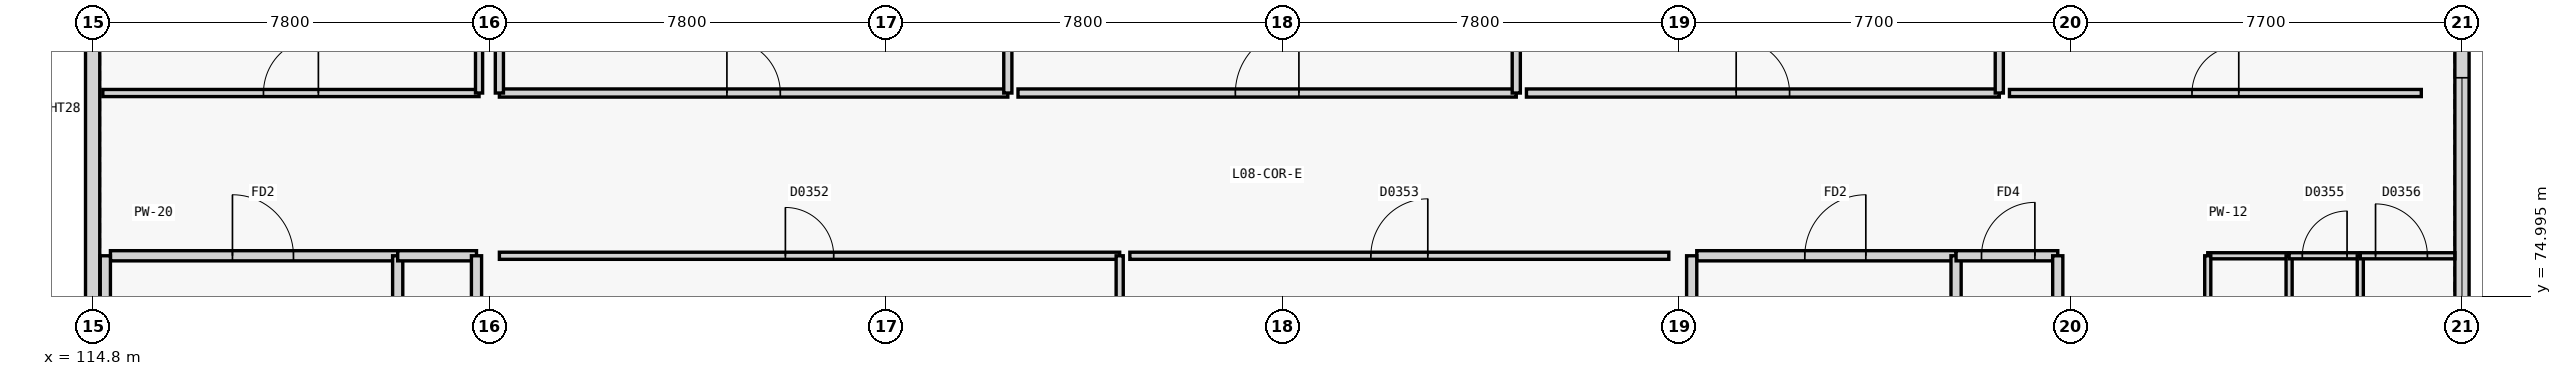
"""IFC4 building model, lengths in metres.
Left out: names, types, materials, properties, quantities, classifications, styles, units other than length and angle.
Written with IfcOpenShell. Run it as: python <this file> out.ifc"""

import sys

from ifc_helpers import new_model, si_unit, direction, frame, frame_2d, origin, place, context, subcontext, project, spatial, rectangle, extrude, element, fill, save


model = new_model("IFC4")
c1 = context("Model", 3, precision=1e-05, world=origin(), true_north=direction((0.0, 1.0)))
c2 = subcontext(c1, "Body", "Model", "MODEL_VIEW")
j1 = project(units=[si_unit("LENGTHUNIT", "METRE"), si_unit("PLANEANGLEUNIT", "RADIAN")], contexts=[c1])
p1 = place(None, origin())
s1 = spatial("IfcSite", under=j1, at=p1, CompositionType="ELEMENT")
p2 = place(p1, origin())
s2 = spatial("IfcBuilding", under=s1, at=p2, CompositionType="ELEMENT")
p3 = place(p2, frame((0.0, 0.0, 32.4)))
s3 = spatial("IfcBuildingStorey", under=s2, at=p3, CompositionType="ELEMENT", Elevation=32.4)
p4 = place(p3, frame((161.4, 96.802, 0.0), z_axis=(0.0, 0.0, 1.0), x_axis=(0.0, -1.0, 0.0)))
e1 = element("IfcWall", 1, at=p4, inside=s3, PredefinedType="SOLIDWALL", context=c2, shape_type="SweptSolid", body=[
    extrude(rectangle(XDim=32.604, YDim=0.28, at=frame_2d((16.302, 0.0))), origin(), (0.0, 0.0, 1.0), 2.8),
])
p5 = place(p4, frame((17.502, 0.0, 0.82)))
e2 = element("IfcOpeningElement", 2, at=p5, cuts=e1, PredefinedType="OPENING", context=c2, shape_type="SweptSolid", body=[
    extrude(rectangle(XDim=4.6, YDim=1.6, at=frame_2d((2.3, 0.8))), frame((0.0, 0.15, 0.0), z_axis=(0.0, -1.0, 0.0), x_axis=(1.0, 0.0, 0.0)), (0.0, 0.0, 1.0), 0.3),
])
p6 = place(p3, frame((114.8, 72.598, 0.0), z_axis=(0.0, 0.0, 1.0), x_axis=(0.0, 1.0, 0.0)))
e3 = element("IfcWall", 3, at=p6, inside=s3, PredefinedType="SOLIDWALL", context=c2, shape_type="SweptSolid", body=[
    extrude(rectangle(XDim=12.204, YDim=0.28, at=frame_2d((6.102, 0.0))), origin(), (0.0, 0.0, 1.0), 2.8),
])
p7 = place(p3, frame((115.15, 75.8, 0.0), z_axis=(0.0, 0.0, 1.0), x_axis=(1.0, 0.0, 0.0)))
e4 = element("IfcWall", 4, at=p7, inside=s3, PredefinedType="PARTITIONING", context=c2, shape_type="SweptSolid", body=[
    extrude(rectangle(XDim=5.65, YDim=0.2, at=frame_2d((2.825, 0.0))), origin(), (0.0, 0.0, 1.0), 3.32),
])
p8 = place(p7, frame((2.4, 0.0, 0.0)))
e5 = element("IfcOpeningElement", 5, at=p8, cuts=e4, PredefinedType="OPENING", context=c2, shape_type="SweptSolid", body=[
    extrude(rectangle(XDim=1.2, YDim=2.2, at=frame_2d((0.6, 1.1))), frame((0.0, 0.11, 0.0), z_axis=(0.0, -1.0, 0.0), x_axis=(1.0, 0.0, 0.0)), (0.0, 0.0, 1.0), 0.22),
])
p9 = place(p3, frame((115.05, 72.4, 0.0), z_axis=(0.0, 0.0, 1.0), x_axis=(0.0, 1.0, 0.0)))
e6 = element("IfcWall", 6, at=p9, inside=s3, PredefinedType="PARTITIONING", context=c2, shape_type="SweptSolid", body=[
    extrude(rectangle(XDim=3.4, YDim=0.2, at=frame_2d((1.7, 0.0))), origin(), (0.0, 0.0, 1.0), 2.8),
])
p10 = place(p3, frame((120.8, 72.4, 0.0), z_axis=(0.0, 0.0, 1.0), x_axis=(0.0, 1.0, 0.0)))
e7 = element("IfcWall", 7, at=p10, inside=s3, PredefinedType="PARTITIONING", context=c2, shape_type="SweptSolid", body=[
    extrude(rectangle(XDim=3.4, YDim=0.2, at=frame_2d((1.7, 0.0))), origin(), (0.0, 0.0, 1.0), 3.32),
])
p11 = place(p10, frame((1.1, 0.0, 0.0)))
e8 = element("IfcOpeningElement", 8, at=p11, cuts=e7, PredefinedType="OPENING", context=c2, shape_type="SweptSolid", body=[
    extrude(rectangle(XDim=1.2, YDim=2.2, at=frame_2d((0.6, 1.1))), frame((0.0, 0.11, 0.0), z_axis=(0.0, -1.0, 0.0), x_axis=(1.0, 0.0, 0.0)), (0.0, 0.0, 1.0), 0.22),
])
p12 = place(p3, frame((120.8, 75.8, 0.0), z_axis=(0.0, 0.0, 1.0), x_axis=(1.0, 0.0, 0.0)))
e9 = element("IfcWall", 9, at=p12, inside=s3, PredefinedType="PARTITIONING", context=c2, shape_type="SweptSolid", body=[
    extrude(rectangle(XDim=1.55, YDim=0.2, at=frame_2d((0.775, 0.0))), origin(), (0.0, 0.0, 1.0), 3.32),
])
p13 = place(p3, frame((122.35, 72.4, 0.0), z_axis=(0.0, 0.0, 1.0), x_axis=(0.0, 1.0, 0.0)))
e10 = element("IfcWall", 10, at=p13, inside=s3, PredefinedType="PARTITIONING", context=c2, shape_type="SweptSolid", body=[
    extrude(rectangle(XDim=3.4, YDim=0.2, at=frame_2d((1.7, 0.0))), origin(), (0.0, 0.0, 1.0), 2.88),
])
p14 = place(p3, frame((146.35, 75.8, 0.0), z_axis=(0.0, 0.0, 1.0), x_axis=(1.0, 0.0, 0.0)))
e11 = element("IfcWall", 11, at=p14, inside=s3, PredefinedType="PARTITIONING", context=c2, shape_type="SweptSolid", body=[
    extrude(rectangle(XDim=5.1, YDim=0.2, at=frame_2d((2.55, 0.0))), origin(), (0.0, 0.0, 1.0), 3.32),
])
p15 = place(p14, frame((2.125, 0.0, 0.0)))
e12 = element("IfcOpeningElement", 12, at=p15, cuts=e11, PredefinedType="OPENING", context=c2, shape_type="SweptSolid", body=[
    extrude(rectangle(XDim=1.2, YDim=2.2, at=frame_2d((0.6, 1.1))), frame((0.0, 0.11, 0.0), z_axis=(0.0, -1.0, 0.0), x_axis=(1.0, 0.0, 0.0)), (0.0, 0.0, 1.0), 0.22),
])
p16 = place(p3, frame((146.25, 72.4, 0.0), z_axis=(0.0, 0.0, 1.0), x_axis=(0.0, 1.0, 0.0)))
e13 = element("IfcWall", 13, at=p16, inside=s3, PredefinedType="PARTITIONING", context=c2, shape_type="SweptSolid", body=[
    extrude(rectangle(XDim=3.4, YDim=0.2, at=frame_2d((1.7, 0.0))), origin(), (0.0, 0.0, 1.0), 2.88),
])
p17 = place(p3, frame((151.45, 72.4, 0.0), z_axis=(0.0, 0.0, 1.0), x_axis=(0.0, 1.0, 0.0)))
e14 = element("IfcWall", 14, at=p17, inside=s3, PredefinedType="PARTITIONING", context=c2, shape_type="SweptSolid", body=[
    extrude(rectangle(XDim=3.4, YDim=0.2, at=frame_2d((1.7, 0.0))), origin(), (0.0, 0.0, 1.0), 3.32),
])
p18 = place(p17, frame((1.1, 0.0, 0.0)))
e15 = element("IfcOpeningElement", 15, at=p18, cuts=e14, PredefinedType="OPENING", context=c2, shape_type="SweptSolid", body=[
    extrude(rectangle(XDim=1.2, YDim=2.2, at=frame_2d((0.6, 1.1))), frame((0.0, 0.11, 0.0), z_axis=(0.0, -1.0, 0.0), x_axis=(1.0, 0.0, 0.0)), (0.0, 0.0, 1.0), 0.22),
])
p19 = place(p3, frame((151.45, 75.8, 0.0), z_axis=(0.0, 0.0, 1.0), x_axis=(1.0, 0.0, 0.0)))
e16 = element("IfcWall", 16, at=p19, inside=s3, PredefinedType="PARTITIONING", context=c2, shape_type="SweptSolid", body=[
    extrude(rectangle(XDim=2.0, YDim=0.2, at=frame_2d((1.0, 0.0))), origin(), (0.0, 0.0, 1.0), 3.32),
])
p20 = place(p19, frame((0.5, 0.0, 0.0)))
e17 = element("IfcOpeningElement", 17, at=p20, cuts=e16, PredefinedType="OPENING", context=c2, shape_type="SweptSolid", body=[
    extrude(rectangle(XDim=1.05, YDim=2.15, at=frame_2d((0.525, 1.075))), frame((0.0, 0.11, 0.0), z_axis=(0.0, -1.0, 0.0), x_axis=(1.0, 0.0, 0.0)), (0.0, 0.0, 1.0), 0.22),
])
p21 = place(p3, frame((153.45, 72.4, 0.0), z_axis=(0.0, 0.0, 1.0), x_axis=(0.0, 1.0, 0.0)))
e18 = element("IfcWall", 18, at=p21, inside=s3, PredefinedType="PARTITIONING", context=c2, shape_type="SweptSolid", body=[
    extrude(rectangle(XDim=3.4, YDim=0.2, at=frame_2d((1.7, 0.0))), origin(), (0.0, 0.0, 1.0), 2.88),
])
p22 = place(p3, frame((115.0, 79.0, 0.0), z_axis=(0.0, 0.0, 1.0), x_axis=(1.0, 0.0, 0.0)))
e19 = element("IfcWall", 19, at=p22, inside=s3, PredefinedType="PARTITIONING", context=c2, shape_type="SweptSolid", body=[
    extrude(rectangle(XDim=7.4, YDim=0.14, at=frame_2d((3.7, 0.0))), origin(), (0.0, 0.0, 1.0), 3.34),
])
p23 = place(p22, frame((3.16, 0.0, 0.0)))
e20 = element("IfcOpeningElement", 20, at=p23, cuts=e19, PredefinedType="OPENING", context=c2, shape_type="SweptSolid", body=[
    extrude(rectangle(XDim=1.08, YDim=2.2, at=frame_2d((0.54, 1.1))), frame((0.0, 0.08, 0.0), z_axis=(0.0, -1.0, 0.0), x_axis=(1.0, 0.0, 0.0)), (0.0, 0.0, 1.0), 0.16),
])
p24 = place(p3, frame((122.4, 79.0, 0.0), z_axis=(0.0, 0.0, 1.0), x_axis=(0.0, 1.0, 0.0)))
e21 = element("IfcWall", 21, at=p24, inside=s3, PredefinedType="PARTITIONING", context=c2, shape_type="SweptSolid", body=[
    extrude(rectangle(XDim=5.4, YDim=0.14, at=frame_2d((2.7, 0.0))), origin(), (0.0, 0.0, 1.0), 2.88),
])
p25 = place(p3, frame((122.8, 75.8, 0.0), z_axis=(0.0, 0.0, 1.0), x_axis=(1.0, 0.0, 0.0)))
e22 = element("IfcWall", 22, at=p25, inside=s3, PredefinedType="PARTITIONING", context=c2, shape_type="SweptSolid", body=[
    extrude(rectangle(XDim=12.2, YDim=0.14, at=frame_2d((6.1, 0.0))), origin(), (0.0, 0.0, 1.0), 3.34),
])
p26 = place(p25, frame((5.625, 0.0, 0.0)))
e23 = element("IfcOpeningElement", 23, at=p26, cuts=e22, PredefinedType="OPENING", context=c2, shape_type="SweptSolid", body=[
    extrude(rectangle(XDim=0.95, YDim=2.1, at=frame_2d((0.475, 1.05))), frame((0.0, 0.08, 0.0), z_axis=(0.0, -1.0, 0.0), x_axis=(1.0, 0.0, 0.0)), (0.0, 0.0, 1.0), 0.16),
])
p27 = place(p3, frame((135.0, 65.2, 0.0), z_axis=(0.0, 0.0, 1.0), x_axis=(0.0, 1.0, 0.0)))
e24 = element("IfcWall", 24, at=p27, inside=s3, PredefinedType="PARTITIONING", context=c2, shape_type="SweptSolid", body=[
    extrude(rectangle(XDim=10.6, YDim=0.14, at=frame_2d((5.3, 0.0))), origin(), (0.0, 0.0, 1.0), 3.34),
])
p28 = place(p3, frame((135.2, 75.8, 0.0), z_axis=(0.0, 0.0, 1.0), x_axis=(1.0, 0.0, 0.0)))
e25 = element("IfcWall", 25, at=p28, inside=s3, PredefinedType="PARTITIONING", context=c2, shape_type="SweptSolid", body=[
    extrude(rectangle(XDim=10.6, YDim=0.14, at=frame_2d((5.3, 0.0))), origin(), (0.0, 0.0, 1.0), 3.34),
])
p29 = place(p28, frame((4.74, 0.0, 0.0)))
e26 = element("IfcOpeningElement", 26, at=p29, cuts=e25, PredefinedType="OPENING", context=c2, shape_type="SweptSolid", body=[
    extrude(rectangle(XDim=1.12, YDim=2.15, at=frame_2d((0.56, 1.075))), frame((0.0, 0.08, 0.0), z_axis=(0.0, -1.0, 0.0), x_axis=(1.0, 0.0, 0.0)), (0.0, 0.0, 1.0), 0.16),
])
p30 = place(p3, frame((156.4, 75.8, 0.0), z_axis=(0.0, 0.0, 1.0), x_axis=(1.0, 0.0, 0.0)))
e27 = element("IfcWall", 27, at=p30, inside=s3, PredefinedType="PARTITIONING", context=c2, shape_type="SweptSolid", body=[
    extrude(rectangle(XDim=1.6, YDim=0.12, at=frame_2d((0.8, 0.0))), origin(), (0.0, 0.0, 1.0), 3.34),
])
p31 = place(p3, frame((156.4, 70.6, 0.0), z_axis=(0.0, 0.0, 1.0), x_axis=(0.0, 1.0, 0.0)))
e28 = element("IfcWall", 28, at=p31, inside=s3, PredefinedType="PARTITIONING", context=c2, shape_type="SweptSolid", body=[
    extrude(rectangle(XDim=5.2, YDim=0.12, at=frame_2d((2.6, 0.0))), origin(), (0.0, 0.0, 1.0), 3.34),
])
p32 = place(p31, frame((2.16, 0.0, 0.0)))
e29 = element("IfcOpeningElement", 29, at=p32, cuts=e28, PredefinedType="OPENING", context=c2, shape_type="SweptSolid", body=[
    extrude(rectangle(XDim=0.88, YDim=2.1, at=frame_2d((0.44, 1.05))), frame((0.0, 0.07, 0.0), z_axis=(0.0, -1.0, 0.0), x_axis=(1.0, 0.0, 0.0)), (0.0, 0.0, 1.0), 0.14),
])
p33 = place(p3, frame((158.0, 70.6, 0.0), z_axis=(0.0, 0.0, 1.0), x_axis=(0.0, 1.0, 0.0)))
e30 = element("IfcWall", 30, at=p33, inside=s3, PredefinedType="PARTITIONING", context=c2, shape_type="SweptSolid", body=[
    extrude(rectangle(XDim=5.2, YDim=0.12, at=frame_2d((2.6, 0.0))), origin(), (0.0, 0.0, 1.0), 3.34),
])
p34 = place(p3, frame((158.0, 75.8, 0.0), z_axis=(0.0, 0.0, 1.0), x_axis=(1.0, 0.0, 0.0)))
e31 = element("IfcWall", 31, at=p34, inside=s3, PredefinedType="PARTITIONING", context=c2, shape_type="SweptSolid", body=[
    extrude(rectangle(XDim=1.4, YDim=0.12, at=frame_2d((0.7, 0.0))), origin(), (0.0, 0.0, 1.0), 3.34),
])
p35 = place(p34, frame((0.26, 0.0, 0.0)))
e32 = element("IfcOpeningElement", 32, at=p35, cuts=e31, PredefinedType="OPENING", context=c2, shape_type="SweptSolid", body=[
    extrude(rectangle(XDim=0.88, YDim=2.1, at=frame_2d((0.44, 1.05))), frame((0.0, 0.07, 0.0), z_axis=(0.0, -1.0, 0.0), x_axis=(1.0, 0.0, 0.0)), (0.0, 0.0, 1.0), 0.14),
])
p36 = place(p3, frame((159.4, 70.6, 0.0), z_axis=(0.0, 0.0, 1.0), x_axis=(0.0, 1.0, 0.0)))
e33 = element("IfcWall", 33, at=p36, inside=s3, PredefinedType="PARTITIONING", context=c2, shape_type="SweptSolid", body=[
    extrude(rectangle(XDim=5.2, YDim=0.12, at=frame_2d((2.6, 0.0))), origin(), (0.0, 0.0, 1.0), 3.34),
])
p37 = place(p3, frame((159.4, 75.8, 0.0), z_axis=(0.0, 0.0, 1.0), x_axis=(1.0, 0.0, 0.0)))
e34 = element("IfcWall", 34, at=p37, inside=s3, PredefinedType="PARTITIONING", context=c2, shape_type="SweptSolid", body=[
    extrude(rectangle(XDim=1.86, YDim=0.12, at=frame_2d((0.93, 0.0))), origin(), (0.0, 0.0, 1.0), 3.34),
])
p38 = place(p37, frame((0.3, 0.0, 0.0)))
e35 = element("IfcOpeningElement", 35, at=p38, cuts=e34, PredefinedType="OPENING", context=c2, shape_type="SweptSolid", body=[
    extrude(rectangle(XDim=1.02, YDim=2.1, at=frame_2d((0.51, 1.05))), frame((0.0, 0.07, 0.0), z_axis=(0.0, -1.0, 0.0), x_axis=(1.0, 0.0, 0.0)), (0.0, 0.0, 1.0), 0.14),
])
p39 = place(p3, frame((122.8, 79.0, 0.0), z_axis=(0.0, 0.0, 1.0), x_axis=(1.0, 0.0, 0.0)))
e36 = element("IfcWall", 36, at=p39, inside=s3, PredefinedType="PARTITIONING", context=c2, shape_type="SweptSolid", body=[
    extrude(rectangle(XDim=10.0, YDim=0.16, at=frame_2d((5.0, 0.0))), origin(), (0.0, 0.0, 1.0), 3.34),
])
p40 = place(p39, frame((4.475, 0.0, 0.0)))
e37 = element("IfcOpeningElement", 37, at=p40, cuts=e36, PredefinedType="OPENING", context=c2, shape_type="SweptSolid", body=[
    extrude(rectangle(XDim=1.05, YDim=2.15, at=frame_2d((0.525, 1.075))), frame((0.0, 0.09, 0.0), z_axis=(0.0, -1.0, 0.0), x_axis=(1.0, 0.0, 0.0)), (0.0, 0.0, 1.0), 0.18),
])
p41 = place(p3, frame((122.8, 79.0, 0.0), z_axis=(0.0, 0.0, 1.0), x_axis=(0.0, 1.0, 0.0)))
e38 = element("IfcWall", 38, at=p41, inside=s3, PredefinedType="PARTITIONING", context=c2, shape_type="SweptSolid", body=[
    extrude(rectangle(XDim=17.6, YDim=0.16, at=frame_2d((8.8, 0.0))), origin(), (0.0, 0.0, 1.0), 2.88),
])
p42 = place(p3, frame((132.8, 79.0, 0.0), z_axis=(0.0, 0.0, 1.0), x_axis=(0.0, 1.0, 0.0)))
e39 = element("IfcWall", 39, at=p42, inside=s3, PredefinedType="PARTITIONING", context=c2, shape_type="SweptSolid", body=[
    extrude(rectangle(XDim=17.6, YDim=0.16, at=frame_2d((8.8, 0.0))), origin(), (0.0, 0.0, 1.0), 3.34),
])
p43 = place(p3, frame((133.0, 79.0, 0.0), z_axis=(0.0, 0.0, 1.0), x_axis=(1.0, 0.0, 0.0)))
e40 = element("IfcWall", 40, at=p43, inside=s3, PredefinedType="PARTITIONING", context=c2, shape_type="SweptSolid", body=[
    extrude(rectangle(XDim=9.8, YDim=0.16, at=frame_2d((4.9, 0.0))), origin(), (0.0, 0.0, 1.0), 3.34),
])
p44 = place(p43, frame((4.275, 0.0, 0.0)))
e41 = element("IfcOpeningElement", 41, at=p44, cuts=e40, PredefinedType="OPENING", context=c2, shape_type="SweptSolid", body=[
    extrude(rectangle(XDim=1.25, YDim=2.2, at=frame_2d((0.625, 1.1))), frame((0.0, 0.09, 0.0), z_axis=(0.0, -1.0, 0.0), x_axis=(1.0, 0.0, 0.0)), (0.0, 0.0, 1.0), 0.18),
])
p45 = place(p3, frame((142.8, 79.0, 0.0), z_axis=(0.0, 0.0, 1.0), x_axis=(0.0, 1.0, 0.0)))
e42 = element("IfcWall", 42, at=p45, inside=s3, PredefinedType="PARTITIONING", context=c2, shape_type="SweptSolid", body=[
    extrude(rectangle(XDim=17.6, YDim=0.16, at=frame_2d((8.8, 0.0))), origin(), (0.0, 0.0, 1.0), 3.34),
])
p46 = place(p3, frame((143.0, 79.0, 0.0), z_axis=(0.0, 0.0, 1.0), x_axis=(1.0, 0.0, 0.0)))
e43 = element("IfcWall", 43, at=p46, inside=s3, PredefinedType="PARTITIONING", context=c2, shape_type="SweptSolid", body=[
    extrude(rectangle(XDim=9.3, YDim=0.16, at=frame_2d((4.65, 0.0))), origin(), (0.0, 0.0, 1.0), 3.34),
])
p47 = place(p46, frame((4.125, 0.0, 0.0)))
e44 = element("IfcOpeningElement", 44, at=p47, cuts=e43, PredefinedType="OPENING", context=c2, shape_type="SweptSolid", body=[
    extrude(rectangle(XDim=1.05, YDim=2.15, at=frame_2d((0.525, 1.075))), frame((0.0, 0.09, 0.0), z_axis=(0.0, -1.0, 0.0), x_axis=(1.0, 0.0, 0.0)), (0.0, 0.0, 1.0), 0.18),
])
p48 = place(p3, frame((152.3, 79.0, 0.0), z_axis=(0.0, 0.0, 1.0), x_axis=(0.0, 1.0, 0.0)))
e45 = element("IfcWall", 45, at=p48, inside=s3, PredefinedType="PARTITIONING", context=c2, shape_type="SweptSolid", body=[
    extrude(rectangle(XDim=17.6, YDim=0.16, at=frame_2d((8.8, 0.0))), origin(), (0.0, 0.0, 1.0), 3.34),
])
p49 = place(p3, frame((152.5, 79.0, 0.0), z_axis=(0.0, 0.0, 1.0), x_axis=(1.0, 0.0, 0.0)))
e46 = element("IfcWall", 46, at=p49, inside=s3, PredefinedType="PARTITIONING", context=c2, shape_type="SweptSolid", body=[
    extrude(rectangle(XDim=8.1, YDim=0.14, at=frame_2d((4.05, 0.0))), origin(), (0.0, 0.0, 1.0), 3.34),
])
p50 = place(p49, frame((3.59, 0.0, 0.0)))
e47 = element("IfcOpeningElement", 47, at=p50, cuts=e46, PredefinedType="OPENING", context=c2, shape_type="SweptSolid", body=[
    extrude(rectangle(XDim=0.92, YDim=2.15, at=frame_2d((0.46, 1.075))), frame((0.0, 0.08, 0.0), z_axis=(0.0, -1.0, 0.0), x_axis=(1.0, 0.0, 0.0)), (0.0, 0.0, 1.0), 0.16),
])
p51 = place(p5, origin())
e48 = element("IfcWindow", 48, at=p51, inside=s3, PartitioningType="SINGLE_PANEL", PredefinedType="WINDOW", context=c2, shape_type="SweptSolid", body=[
    extrude(rectangle(XDim=4.6, YDim=1.6, at=frame_2d((2.3, 0.8))), frame((0.0, 0.03, 0.0), z_axis=(0.0, -1.0, 0.0), x_axis=(1.0, 0.0, 0.0)), (0.0, 0.0, 1.0), 0.06),
])
fill(e2, e48)
p52 = place(p8, origin())
e49 = element("IfcDoor", 49, at=p52, inside=s3, OperationType="SINGLE_SWING_LEFT", PredefinedType="DOOR", context=c2, shape_type="SweptSolid", body=[
    extrude(rectangle(XDim=1.2, YDim=2.2, at=frame_2d((0.6, 1.1))), frame((0.0, 0.025, 0.0), z_axis=(0.0, -1.0, 0.0), x_axis=(1.0, 0.0, 0.0)), (0.0, 0.0, 1.0), 0.05),
])
fill(e5, e49)
p53 = place(p15, origin())
e50 = element("IfcDoor", 50, at=p53, inside=s3, OperationType="SINGLE_SWING_RIGHT", PredefinedType="DOOR", context=c2, shape_type="SweptSolid", body=[
    extrude(rectangle(XDim=1.2, YDim=2.2, at=frame_2d((0.6, 1.1))), frame((0.0, 0.025, 0.0), z_axis=(0.0, -1.0, 0.0), x_axis=(1.0, 0.0, 0.0)), (0.0, 0.0, 1.0), 0.05),
])
fill(e12, e50)
p54 = place(p20, origin())
e51 = element("IfcDoor", 51, at=p54, inside=s3, OperationType="SINGLE_SWING_RIGHT", PredefinedType="DOOR", context=c2, shape_type="SweptSolid", body=[
    extrude(rectangle(XDim=1.05, YDim=2.15, at=frame_2d((0.525, 1.075))), frame((0.0, 0.025, 0.0), z_axis=(0.0, -1.0, 0.0), x_axis=(1.0, 0.0, 0.0)), (0.0, 0.0, 1.0), 0.05),
])
fill(e17, e51)
p55 = place(p23, origin())
e52 = element("IfcDoor", 52, at=p55, inside=s3, OperationType="SINGLE_SWING_RIGHT", PredefinedType="DOOR", context=c2, shape_type="SweptSolid", body=[
    extrude(rectangle(XDim=1.08, YDim=2.2, at=frame_2d((0.54, 1.1))), frame((0.0, 0.025, 0.0), z_axis=(0.0, -1.0, 0.0), x_axis=(1.0, 0.0, 0.0)), (0.0, 0.0, 1.0), 0.05),
])
fill(e20, e52)
p56 = place(p26, origin())
e53 = element("IfcDoor", 53, at=p56, inside=s3, OperationType="SINGLE_SWING_LEFT", PredefinedType="DOOR", context=c2, shape_type="SweptSolid", body=[
    extrude(rectangle(XDim=0.95, YDim=2.1, at=frame_2d((0.475, 1.05))), frame((0.0, 0.025, 0.0), z_axis=(0.0, -1.0, 0.0), x_axis=(1.0, 0.0, 0.0)), (0.0, 0.0, 1.0), 0.05),
])
fill(e23, e53)
p57 = place(p29, origin())
e54 = element("IfcDoor", 54, at=p57, inside=s3, OperationType="SINGLE_SWING_RIGHT", PredefinedType="DOOR", context=c2, shape_type="SweptSolid", body=[
    extrude(rectangle(XDim=1.12, YDim=2.15, at=frame_2d((0.56, 1.075))), frame((0.0, 0.025, 0.0), z_axis=(0.0, -1.0, 0.0), x_axis=(1.0, 0.0, 0.0)), (0.0, 0.0, 1.0), 0.05),
])
fill(e26, e54)
p58 = place(p35, origin())
e55 = element("IfcDoor", 55, at=p58, inside=s3, OperationType="SINGLE_SWING_RIGHT", PredefinedType="DOOR", context=c2, shape_type="SweptSolid", body=[
    extrude(rectangle(XDim=0.88, YDim=2.1, at=frame_2d((0.44, 1.05))), frame((0.0, 0.025, 0.0), z_axis=(0.0, -1.0, 0.0), x_axis=(1.0, 0.0, 0.0)), (0.0, 0.0, 1.0), 0.05),
])
fill(e32, e55)
p59 = place(p38, origin())
e56 = element("IfcDoor", 56, at=p59, inside=s3, OperationType="SINGLE_SWING_LEFT", PredefinedType="DOOR", context=c2, shape_type="SweptSolid", body=[
    extrude(rectangle(XDim=1.02, YDim=2.1, at=frame_2d((0.51, 1.05))), frame((0.0, 0.025, 0.0), z_axis=(0.0, -1.0, 0.0), x_axis=(1.0, 0.0, 0.0)), (0.0, 0.0, 1.0), 0.05),
])
fill(e35, e56)
p60 = place(p40, origin())
e57 = element("IfcDoor", 57, at=p60, inside=s3, OperationType="SINGLE_SWING_LEFT", PredefinedType="DOOR", context=c2, shape_type="SweptSolid", body=[
    extrude(rectangle(XDim=1.05, YDim=2.15, at=frame_2d((0.525, 1.075))), frame((0.0, 0.025, 0.0), z_axis=(0.0, -1.0, 0.0), x_axis=(1.0, 0.0, 0.0)), (0.0, 0.0, 1.0), 0.05),
])
fill(e37, e57)
p61 = place(p44, origin())
e58 = element("IfcDoor", 58, at=p61, inside=s3, OperationType="SINGLE_SWING_RIGHT", PredefinedType="DOOR", context=c2, shape_type="SweptSolid", body=[
    extrude(rectangle(XDim=1.25, YDim=2.2, at=frame_2d((0.625, 1.1))), frame((0.0, 0.025, 0.0), z_axis=(0.0, -1.0, 0.0), x_axis=(1.0, 0.0, 0.0)), (0.0, 0.0, 1.0), 0.05),
])
fill(e41, e58)
p62 = place(p47, origin())
e59 = element("IfcDoor", 59, at=p62, inside=s3, OperationType="SINGLE_SWING_LEFT", PredefinedType="DOOR", context=c2, shape_type="SweptSolid", body=[
    extrude(rectangle(XDim=1.05, YDim=2.15, at=frame_2d((0.525, 1.075))), frame((0.0, 0.025, 0.0), z_axis=(0.0, -1.0, 0.0), x_axis=(1.0, 0.0, 0.0)), (0.0, 0.0, 1.0), 0.05),
])
fill(e44, e59)
p63 = place(p50, origin())
e60 = element("IfcDoor", 60, at=p63, inside=s3, OperationType="SINGLE_SWING_RIGHT", PredefinedType="DOOR", context=c2, shape_type="SweptSolid", body=[
    extrude(rectangle(XDim=0.92, YDim=2.15, at=frame_2d((0.46, 1.075))), frame((0.0, 0.025, 0.0), z_axis=(0.0, -1.0, 0.0), x_axis=(1.0, 0.0, 0.0)), (0.0, 0.0, 1.0), 0.05),
])
fill(e47, e60)
save(model, sys.argv[1])
